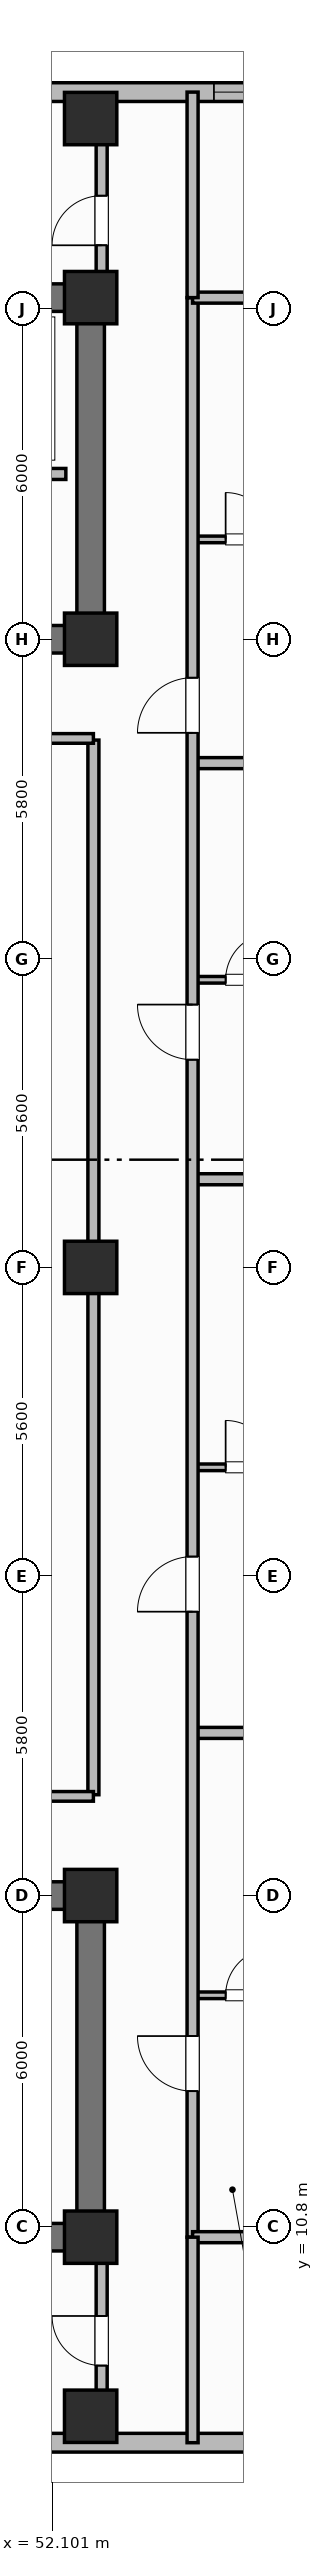
"""IFC4 building model, lengths in metres.
Left out: names, types, materials, properties, quantities, classifications, styles, units other than length and angle.
Written with IfcOpenShell. Run it as: python <this file> out.ifc"""

import sys

from ifc_helpers import new_model, si_unit, direction, frame, frame_2d, origin, origin_2d, place, context, subcontext, project, spatial, rectangle, extrude, element, fill, save


model = new_model("IFC4")
c1 = context("Model", 3, precision=1e-05, world=origin(), true_north=direction((0.0, 1.0)))
c2 = subcontext(c1, "Body", "Model", "MODEL_VIEW")
j1 = project(units=[si_unit("LENGTHUNIT", "METRE"), si_unit("PLANEANGLEUNIT", "RADIAN")], contexts=[c1])
p1 = place(None, origin())
s1 = spatial("IfcSite", under=j1, at=p1, CompositionType="ELEMENT")
p2 = place(p1, origin())
s2 = spatial("IfcBuilding", under=s1, at=p2, CompositionType="ELEMENT")
p3 = place(p2, frame((0.0, 0.0, 177.4)))
s3 = spatial("IfcBuildingStorey", under=s2, at=p3, CompositionType="ELEMENT", Elevation=177.4)
p4 = place(p3, frame((52.8, 10.6, 0.0), z_axis=(0.0, 0.0, 1.0), x_axis=(-1.0, 0.0, 0.0)))
e1 = element("IfcWall", 1, at=p4, inside=s3, PredefinedType="SHEAR", context=c2, shape_type="SweptSolid", body=[
    extrude(rectangle(XDim=27.2, YDim=0.5, at=frame_2d((13.6, 0.0))), origin(), (0.0, 0.0, 1.0), 3.7),
])
p5 = place(p3, frame((52.8, 10.85, 0.0), z_axis=(0.0, 0.0, 1.0), x_axis=(0.0, 1.0, 0.0)))
e2 = element("IfcWall", 2, at=p5, inside=s3, PredefinedType="SHEAR", context=c2, shape_type="SweptSolid", body=[
    extrude(rectangle(XDim=5.7, YDim=0.5, at=frame_2d((2.85, 0.0))), origin(), (0.0, 0.0, 1.0), 3.7),
])
p6 = place(p3, frame((25.6, 16.8, 0.0), z_axis=(0.0, 0.0, 1.0), x_axis=(1.0, 0.0, 0.0)))
e3 = element("IfcWall", 3, at=p6, inside=s3, PredefinedType="SHEAR", context=c2, shape_type="SweptSolid", body=[
    extrude(rectangle(XDim=27.2, YDim=0.5, at=frame_2d((13.6, 0.0))), origin(), (0.0, 0.0, 1.0), 3.7),
])
p7 = place(p6, frame((1.9, 0.0, 0.0)))
e4 = element("IfcOpeningElement", 4, at=p7, cuts=e3, PredefinedType="OPENING", context=c2, shape_type="SweptSolid", body=[
    extrude(rectangle(XDim=1.1, YDim=2.15, at=frame_2d((0.55, 1.075))), frame((0.0, 0.26, 0.0), z_axis=(0.0, -1.0, 0.0), x_axis=(1.0, 0.0, 0.0)), (0.0, 0.0, 1.0), 0.52),
])
p8 = place(p6, frame((13.0, 0.0, 0.0)))
e5 = element("IfcOpeningElement", 5, at=p8, cuts=e3, PredefinedType="OPENING", context=c2, shape_type="SweptSolid", body=[
    extrude(rectangle(XDim=1.2, YDim=2.15, at=frame_2d((0.6, 1.075))), frame((0.0, 0.26, 0.0), z_axis=(0.0, -1.0, 0.0), x_axis=(1.0, 0.0, 0.0)), (0.0, 0.0, 1.0), 0.52),
])
p9 = place(p6, frame((21.6, 0.0, 0.0)))
e6 = element("IfcOpeningElement", 6, at=p9, cuts=e3, PredefinedType="OPENING", context=c2, shape_type="SweptSolid", body=[
    extrude(rectangle(XDim=1.0, YDim=2.15, at=frame_2d((0.5, 1.075))), frame((0.0, 0.26, 0.0), z_axis=(0.0, -1.0, 0.0), x_axis=(1.0, 0.0, 0.0)), (0.0, 0.0, 1.0), 0.52),
])
p10 = place(p3, frame((25.6, 45.8, 0.0), z_axis=(0.0, 0.0, 1.0), x_axis=(1.0, 0.0, 0.0)))
e7 = element("IfcWall", 7, at=p10, inside=s3, PredefinedType="SHEAR", context=c2, shape_type="SweptSolid", body=[
    extrude(rectangle(XDim=27.2, YDim=0.5, at=frame_2d((13.6, 0.0))), origin(), (0.0, 0.0, 1.0), 3.7),
])
p11 = place(p3, frame((52.8, 39.85, 0.0), z_axis=(0.0, 0.0, 1.0), x_axis=(0.0, 1.0, 0.0)))
e8 = element("IfcWall", 8, at=p11, inside=s3, PredefinedType="SHEAR", context=c2, shape_type="SweptSolid", body=[
    extrude(rectangle(XDim=5.7, YDim=0.5, at=frame_2d((2.85, 0.0))), origin(), (0.0, 0.0, 1.0), 3.7),
])
p12 = place(p3, frame((52.8, 39.6, 0.0), z_axis=(0.0, 0.0, 1.0), x_axis=(-1.0, 0.0, 0.0)))
e9 = element("IfcWall", 9, at=p12, inside=s3, PredefinedType="SHEAR", context=c2, shape_type="SweptSolid", body=[
    extrude(rectangle(XDim=27.2, YDim=0.5, at=frame_2d((13.6, 0.0))), origin(), (0.0, 0.0, 1.0), 3.7),
])
p13 = place(p12, frame((24.2, 0.0, 0.0)))
e10 = element("IfcOpeningElement", 10, at=p13, cuts=e9, PredefinedType="OPENING", context=c2, shape_type="SweptSolid", body=[
    extrude(rectangle(XDim=1.1, YDim=2.15, at=frame_2d((0.55, 1.075))), frame((0.0, 0.26, 0.0), z_axis=(0.0, -1.0, 0.0), x_axis=(1.0, 0.0, 0.0)), (0.0, 0.0, 1.0), 0.52),
])
p14 = place(p12, frame((15.1, 0.0, 0.0)))
e11 = element("IfcOpeningElement", 11, at=p14, cuts=e9, PredefinedType="OPENING", context=c2, shape_type="SweptSolid", body=[
    extrude(rectangle(XDim=1.2, YDim=2.15, at=frame_2d((0.6, 1.075))), frame((0.0, 0.26, 0.0), z_axis=(0.0, -1.0, 0.0), x_axis=(1.0, 0.0, 0.0)), (0.0, 0.0, 1.0), 0.52),
])
p15 = place(p12, frame((11.6, 0.0, 0.0)))
e12 = element("IfcOpeningElement", 12, at=p15, cuts=e9, PredefinedType="OPENING", context=c2, shape_type="SweptSolid", body=[
    extrude(rectangle(XDim=0.9, YDim=2.1, at=frame_2d((0.45, 1.05))), frame((0.0, 0.26, 0.0), z_axis=(0.0, -1.0, 0.0), x_axis=(1.0, 0.0, 0.0)), (0.0, 0.0, 1.0), 0.52),
])
p16 = place(p12, frame((7.35, 0.0, 0.0)))
e13 = element("IfcOpeningElement", 13, at=p16, cuts=e9, PredefinedType="OPENING", context=c2, shape_type="SweptSolid", body=[
    extrude(rectangle(XDim=0.85, YDim=2.1, at=frame_2d((0.425, 1.05))), frame((0.0, 0.26, 0.0), z_axis=(0.0, -1.0, 0.0), x_axis=(1.0, 0.0, 0.0)), (0.0, 0.0, 1.0), 0.52),
])
p17 = place(p12, frame((3.6, 0.0, 0.0)))
e14 = element("IfcOpeningElement", 14, at=p17, cuts=e9, PredefinedType="OPENING", context=c2, shape_type="SweptSolid", body=[
    extrude(rectangle(XDim=1.0, YDim=2.15, at=frame_2d((0.5, 1.075))), frame((0.0, 0.26, 0.0), z_axis=(0.0, -1.0, 0.0), x_axis=(1.0, 0.0, 0.0)), (0.0, 0.0, 1.0), 0.52),
])
for number, where, z_axis, x_axis in (
    (15, (52.8, 10.6, 0.0), (0.0, 0.0, 1.0), (1.0, 0.0, 0.0)),
    (16, (52.8, 16.8, 0.0), (0.0, 0.0, 1.0), (1.0, 0.0, 0.0)),
    (17, (52.8, 39.6, 0.0), (0.0, 0.0, 1.0), (1.0, 0.0, 0.0)),
    (18, (52.8, 45.8, 0.0), (0.0, 0.0, 1.0), (1.0, 0.0, 0.0)),
    (19, (52.8, 28.2, 0.0), (0.0, 0.0, 1.0), (1.0, 0.0, 0.0)),
    (20, (52.8, 7.35, 0.0), (0.0, 0.0, 1.0), (1.0, 0.0, 0.0)),
    (21, (52.8, 49.05, 0.0), (0.0, 0.0, 1.0), (1.0, 0.0, 0.0)),
):
    element("IfcColumn", number, at=place(p3, frame(where, z_axis=z_axis, x_axis=x_axis)), inside=s3, PredefinedType="COLUMN", context=c2, shape_type="SweptSolid", body=[
        extrude(rectangle(XDim=0.95, YDim=0.95, at=origin_2d()), origin(), (0.0, 0.0, 1.0), 3.7),
    ])
p18 = place(p3, frame((51.25, 6.87, 0.0), z_axis=(0.0, 0.0, 1.0), x_axis=(1.0, 0.0, 0.0)))
e22 = element("IfcWall", 22, at=p18, inside=s3, PredefinedType="SOLIDWALL", context=c2, shape_type="SweptSolid", body=[
    extrude(rectangle(XDim=6.95, YDim=0.34, at=frame_2d((3.475, 0.0))), origin(), (0.0, 0.0, 1.0), 2.72),
])
p19 = place(p3, frame((58.2, 49.53, 0.0), z_axis=(0.0, 0.0, 1.0), x_axis=(-1.0, 0.0, 0.0)))
e23 = element("IfcWall", 23, at=p19, inside=s3, PredefinedType="SOLIDWALL", context=c2, shape_type="SweptSolid", body=[
    extrude(rectangle(XDim=15.8, YDim=0.34, at=frame_2d((7.9, 0.0))), origin(), (0.0, 0.0, 1.0), 2.72),
])
p20 = place(p19, frame((1.762, 0.0, 0.75)))
e24 = element("IfcOpeningElement", 24, at=p20, cuts=e23, PredefinedType="OPENING", context=c2, shape_type="SweptSolid", body=[
    extrude(rectangle(XDim=1.4, YDim=1.85, at=frame_2d((0.7, 0.925))), frame((0.0, 0.18, 0.0), z_axis=(0.0, -1.0, 0.0), x_axis=(1.0, 0.0, 0.0)), (0.0, 0.0, 1.0), 0.36),
])
p21 = place(p19, frame((8.663, 0.0, 0.75)))
e25 = element("IfcOpeningElement", 25, at=p21, cuts=e23, PredefinedType="OPENING", context=c2, shape_type="SweptSolid", body=[
    extrude(rectangle(XDim=1.4, YDim=1.85, at=frame_2d((0.7, 0.925))), frame((0.0, 0.18, 0.0), z_axis=(0.0, -1.0, 0.0), x_axis=(1.0, 0.0, 0.0)), (0.0, 0.0, 1.0), 0.36),
])
p22 = place(p19, frame((12.288, 0.0, 0.75)))
e26 = element("IfcOpeningElement", 26, at=p22, cuts=e23, PredefinedType="OPENING", context=c2, shape_type="SweptSolid", body=[
    extrude(rectangle(XDim=1.4, YDim=1.85, at=frame_2d((0.7, 0.925))), frame((0.0, 0.18, 0.0), z_axis=(0.0, -1.0, 0.0), x_axis=(1.0, 0.0, 0.0)), (0.0, 0.0, 1.0), 0.36),
])
p23 = place(p3, frame((52.35, 42.6, 0.0), z_axis=(0.0, 0.0, 1.0), x_axis=(-1.0, 0.0, 0.0)))
e27 = element("IfcWall", 27, at=p23, inside=s3, PredefinedType="PARTITIONING", context=c2, shape_type="SweptSolid", body=[
    extrude(rectangle(XDim=6.5, YDim=0.2, at=frame_2d((3.25, 0.0))), origin(), (0.0, 0.0, 1.0), 2.55),
])
p24 = place(p3, frame((52.85, 18.63, 0.0), z_axis=(0.0, 0.0, 1.0), x_axis=(0.0, 1.0, 0.0)))
e28 = element("IfcWall", 28, at=p24, inside=s3, PredefinedType="PARTITIONING", context=c2, shape_type="SweptSolid", body=[
    extrude(rectangle(XDim=19.14, YDim=0.2, at=frame_2d((9.57, 0.0))), origin(), (0.0, 0.0, 1.0), 2.55),
])
for number, where, z_axis, x_axis in (
    (29, (31.35, 18.6, 0.0), (0.0, 0.0, 1.0), (1.0, 0.0, 0.0)),
    (30, (31.35, 37.8, 0.0), (0.0, 0.0, 1.0), (1.0, 0.0, 0.0)),
):
    element("IfcWall", number, at=place(p3, frame(where, z_axis=z_axis, x_axis=x_axis)), inside=s3, PredefinedType="PARTITIONING", context=c2, shape_type="SweptSolid", body=[
        extrude(rectangle(XDim=21.5, YDim=0.175, at=frame_2d((10.75, 0.0))), origin(), (0.0, 0.0, 1.0), 2.55),
    ])
p25 = place(p3, frame((54.65, 14.99, 0.0), z_axis=(0.0, 0.0, 1.0), x_axis=(1.0, 0.0, 0.0)))
e31 = element("IfcWall", 31, at=p25, inside=s3, PredefinedType="PARTITIONING", context=c2, shape_type="SweptSolid", body=[
    extrude(rectangle(XDim=2.25, YDim=0.12, at=frame_2d((1.125, 0.0))), origin(), (0.0, 0.0, 1.0), 2.55),
])
p26 = place(p25, frame((0.6, 0.0, 0.0)))
e32 = element("IfcOpeningElement", 32, at=p26, cuts=e31, PredefinedType="OPENING", context=c2, shape_type="SweptSolid", body=[
    extrude(rectangle(XDim=0.85, YDim=2.1, at=frame_2d((0.425, 1.05))), frame((0.0, 0.07, 0.0), z_axis=(0.0, -1.0, 0.0), x_axis=(1.0, 0.0, 0.0)), (0.0, 0.0, 1.0), 0.14),
])
p27 = place(p3, frame((54.65, 19.752, 0.0), z_axis=(0.0, 0.0, 1.0), x_axis=(1.0, 0.0, 0.0)))
e33 = element("IfcWall", 33, at=p27, inside=s3, PredefinedType="PARTITIONING", context=c2, shape_type="SweptSolid", body=[
    extrude(rectangle(XDim=7.18, YDim=0.2, at=frame_2d((3.59, 0.0))), origin(), (0.0, 0.0, 1.0), 2.55),
])
p28 = place(p3, frame((54.65, 24.572, 0.0), z_axis=(0.0, 0.0, 1.0), x_axis=(1.0, 0.0, 0.0)))
e34 = element("IfcWall", 34, at=p28, inside=s3, PredefinedType="PARTITIONING", context=c2, shape_type="SweptSolid", body=[
    extrude(rectangle(XDim=2.25, YDim=0.12, at=frame_2d((1.125, 0.0))), origin(), (0.0, 0.0, 1.0), 2.55),
])
p29 = place(p28, frame((0.6, 0.0, 0.0)))
e35 = element("IfcOpeningElement", 35, at=p29, cuts=e34, PredefinedType="OPENING", context=c2, shape_type="SweptSolid", body=[
    extrude(rectangle(XDim=0.85, YDim=2.1, at=frame_2d((0.425, 1.05))), frame((0.0, 0.07, 0.0), z_axis=(0.0, -1.0, 0.0), x_axis=(1.0, 0.0, 0.0)), (0.0, 0.0, 1.0), 0.14),
])
p30 = place(p3, frame((54.65, 29.8, 0.0), z_axis=(0.0, 0.0, 1.0), x_axis=(1.0, 0.0, 0.0)))
e36 = element("IfcWall", 36, at=p30, inside=s3, PredefinedType="PARTITIONING", context=c2, shape_type="SweptSolid", body=[
    extrude(rectangle(XDim=6.78, YDim=0.2, at=frame_2d((3.39, 0.0))), origin(), (0.0, 0.0, 1.0), 2.55),
])
p31 = place(p3, frame((54.65, 33.42, 0.0), z_axis=(0.0, 0.0, 1.0), x_axis=(1.0, 0.0, 0.0)))
e37 = element("IfcWall", 37, at=p31, inside=s3, PredefinedType="PARTITIONING", context=c2, shape_type="SweptSolid", body=[
    extrude(rectangle(XDim=2.25, YDim=0.12, at=frame_2d((1.125, 0.0))), origin(), (0.0, 0.0, 1.0), 2.55),
])
p32 = place(p31, frame((0.6, 0.0, 0.0)))
e38 = element("IfcOpeningElement", 38, at=p32, cuts=e37, PredefinedType="OPENING", context=c2, shape_type="SweptSolid", body=[
    extrude(rectangle(XDim=0.85, YDim=2.1, at=frame_2d((0.425, 1.05))), frame((0.0, 0.07, 0.0), z_axis=(0.0, -1.0, 0.0), x_axis=(1.0, 0.0, 0.0)), (0.0, 0.0, 1.0), 0.14),
])
p33 = place(p3, frame((54.65, 37.352, 0.0), z_axis=(0.0, 0.0, 1.0), x_axis=(1.0, 0.0, 0.0)))
e39 = element("IfcWall", 39, at=p33, inside=s3, PredefinedType="PARTITIONING", context=c2, shape_type="SweptSolid", body=[
    extrude(rectangle(XDim=7.18, YDim=0.2, at=frame_2d((3.59, 0.0))), origin(), (0.0, 0.0, 1.0), 2.55),
])
p34 = place(p3, frame((54.65, 41.412, 0.0), z_axis=(0.0, 0.0, 1.0), x_axis=(1.0, 0.0, 0.0)))
e40 = element("IfcWall", 40, at=p34, inside=s3, PredefinedType="PARTITIONING", context=c2, shape_type="SweptSolid", body=[
    extrude(rectangle(XDim=2.25, YDim=0.12, at=frame_2d((1.125, 0.0))), origin(), (0.0, 0.0, 1.0), 2.55),
])
p35 = place(p34, frame((0.6, 0.0, 0.0)))
e41 = element("IfcOpeningElement", 41, at=p35, cuts=e40, PredefinedType="OPENING", context=c2, shape_type="SweptSolid", body=[
    extrude(rectangle(XDim=0.85, YDim=2.1, at=frame_2d((0.425, 1.05))), frame((0.0, 0.07, 0.0), z_axis=(0.0, -1.0, 0.0), x_axis=(1.0, 0.0, 0.0)), (0.0, 0.0, 1.0), 0.14),
])
p36 = place(p3, frame((54.65, 10.6, 0.0), z_axis=(0.0, 0.0, 1.0), x_axis=(0.0, 1.0, 0.0)))
e42 = element("IfcWall", 42, at=p36, inside=s3, PredefinedType="PARTITIONING", context=c2, shape_type="SweptSolid", body=[
    extrude(rectangle(XDim=35.2, YDim=0.2, at=frame_2d((17.6, 0.0))), origin(), (0.0, 0.0, 1.0), 2.55),
])
p37 = place(p36, frame((2.65, 0.0, 0.0)))
e43 = element("IfcOpeningElement", 43, at=p37, cuts=e42, PredefinedType="OPENING", context=c2, shape_type="SweptSolid", body=[
    extrude(rectangle(XDim=1.0, YDim=2.15, at=frame_2d((0.5, 1.075))), frame((0.0, 0.11, 0.0), z_axis=(0.0, -1.0, 0.0), x_axis=(1.0, 0.0, 0.0)), (0.0, 0.0, 1.0), 0.22),
])
p38 = place(p36, frame((11.352, 0.0, 0.0)))
e44 = element("IfcOpeningElement", 44, at=p38, cuts=e42, PredefinedType="OPENING", context=c2, shape_type="SweptSolid", body=[
    extrude(rectangle(XDim=1.0, YDim=2.15, at=frame_2d((0.5, 1.075))), frame((0.0, 0.11, 0.0), z_axis=(0.0, -1.0, 0.0), x_axis=(1.0, 0.0, 0.0)), (0.0, 0.0, 1.0), 0.22),
])
p39 = place(p36, frame((21.37, 0.0, 0.0)))
e45 = element("IfcOpeningElement", 45, at=p39, cuts=e42, PredefinedType="OPENING", context=c2, shape_type="SweptSolid", body=[
    extrude(rectangle(XDim=1.0, YDim=2.15, at=frame_2d((0.5, 1.075))), frame((0.0, 0.11, 0.0), z_axis=(0.0, -1.0, 0.0), x_axis=(1.0, 0.0, 0.0)), (0.0, 0.0, 1.0), 0.22),
])
p40 = place(p36, frame((27.302, 0.0, 0.0)))
e46 = element("IfcOpeningElement", 46, at=p40, cuts=e42, PredefinedType="OPENING", context=c2, shape_type="SweptSolid", body=[
    extrude(rectangle(XDim=1.0, YDim=2.15, at=frame_2d((0.5, 1.075))), frame((0.0, 0.11, 0.0), z_axis=(0.0, -1.0, 0.0), x_axis=(1.0, 0.0, 0.0)), (0.0, 0.0, 1.0), 0.22),
])
for number, where, z_axis, x_axis in (
    (47, (54.65, 10.6, 0.0), (0.0, 0.0, 1.0), (1.0, 0.0, 0.0)),
    (48, (54.65, 45.8, 0.0), (0.0, 0.0, 1.0), (1.0, 0.0, 0.0)),
):
    element("IfcWall", number, at=place(p3, frame(where, z_axis=z_axis, x_axis=x_axis)), inside=s3, PredefinedType="PARTITIONING", context=c2, shape_type="SweptSolid", body=[
        extrude(rectangle(XDim=6.76, YDim=0.2, at=frame_2d((3.38, 0.0))), origin(), (0.0, 0.0, 1.0), 2.55),
    ])
for number, where, z_axis, x_axis in (
    (49, (54.65, 6.87, 0.0), (0.0, 0.0, 1.0), (0.0, 1.0, 0.0)),
    (50, (54.65, 45.8, 0.0), (0.0, 0.0, 1.0), (0.0, 1.0, 0.0)),
):
    element("IfcWall", number, at=place(p3, frame(where, z_axis=z_axis, x_axis=x_axis)), inside=s3, PredefinedType="PARTITIONING", context=c2, shape_type="SweptSolid", body=[
        extrude(rectangle(XDim=3.73, YDim=0.2, at=frame_2d((1.865, 0.0))), origin(), (0.0, 0.0, 1.0), 2.55),
    ])
p41 = place(p3, frame((53.0, 7.62, 0.0), z_axis=(0.0, 0.0, 1.0), x_axis=(0.0, 1.0, 0.0)))
e51 = element("IfcWall", 51, at=p41, inside=s3, PredefinedType="PARTITIONING", context=c2, shape_type="SweptSolid", body=[
    extrude(rectangle(XDim=2.68, YDim=0.2, at=frame_2d((1.34, 0.0))), origin(), (0.0, 0.0, 1.0), 2.55),
])
p42 = place(p41, frame((0.65, 0.0, 0.0)))
e52 = element("IfcOpeningElement", 52, at=p42, cuts=e51, PredefinedType="OPENING", context=c2, shape_type="SweptSolid", body=[
    extrude(rectangle(XDim=0.9, YDim=2.1, at=frame_2d((0.45, 1.05))), frame((0.0, 0.11, 0.0), z_axis=(0.0, -1.0, 0.0), x_axis=(1.0, 0.0, 0.0)), (0.0, 0.0, 1.0), 0.22),
])
p43 = place(p3, frame((53.0, 46.1, 0.0), z_axis=(0.0, 0.0, 1.0), x_axis=(0.0, 1.0, 0.0)))
e53 = element("IfcWall", 53, at=p43, inside=s3, PredefinedType="PARTITIONING", context=c2, shape_type="SweptSolid", body=[
    extrude(rectangle(XDim=2.68, YDim=0.2, at=frame_2d((1.34, 0.0))), origin(), (0.0, 0.0, 1.0), 2.55),
])
p44 = place(p43, frame((0.65, 0.0, 0.0)))
e54 = element("IfcOpeningElement", 54, at=p44, cuts=e53, PredefinedType="OPENING", context=c2, shape_type="SweptSolid", body=[
    extrude(rectangle(XDim=0.9, YDim=2.1, at=frame_2d((0.45, 1.05))), frame((0.0, 0.11, 0.0), z_axis=(0.0, -1.0, 0.0), x_axis=(1.0, 0.0, 0.0)), (0.0, 0.0, 1.0), 0.22),
])
p45 = place(p20, origin())
e55 = element("IfcWindow", 55, at=p45, inside=s3, PartitioningType="SINGLE_PANEL", PredefinedType="WINDOW", context=c2, shape_type="SweptSolid", body=[
    extrude(rectangle(XDim=1.4, YDim=1.85, at=frame_2d((0.7, 0.925))), frame((0.0, 0.03, 0.0), z_axis=(0.0, -1.0, 0.0), x_axis=(1.0, 0.0, 0.0)), (0.0, 0.0, 1.0), 0.06),
])
fill(e24, e55)
p46 = place(p26, origin())
e56 = element("IfcDoor", 56, at=p46, inside=s3, OperationType="SINGLE_SWING_RIGHT", PredefinedType="DOOR", context=c2, shape_type="SweptSolid", body=[
    extrude(rectangle(XDim=0.85, YDim=2.1, at=frame_2d((0.425, 1.05))), frame((0.0, 0.025, 0.0), z_axis=(0.0, -1.0, 0.0), x_axis=(1.0, 0.0, 0.0)), (0.0, 0.0, 1.0), 0.05),
])
fill(e32, e56)
p47 = place(p29, origin())
e57 = element("IfcDoor", 57, at=p47, inside=s3, OperationType="SINGLE_SWING_LEFT", PredefinedType="DOOR", context=c2, shape_type="SweptSolid", body=[
    extrude(rectangle(XDim=0.85, YDim=2.1, at=frame_2d((0.425, 1.05))), frame((0.0, 0.025, 0.0), z_axis=(0.0, -1.0, 0.0), x_axis=(1.0, 0.0, 0.0)), (0.0, 0.0, 1.0), 0.05),
])
fill(e35, e57)
p48 = place(p32, origin())
e58 = element("IfcDoor", 58, at=p48, inside=s3, OperationType="SINGLE_SWING_RIGHT", PredefinedType="DOOR", context=c2, shape_type="SweptSolid", body=[
    extrude(rectangle(XDim=0.85, YDim=2.1, at=frame_2d((0.425, 1.05))), frame((0.0, 0.025, 0.0), z_axis=(0.0, -1.0, 0.0), x_axis=(1.0, 0.0, 0.0)), (0.0, 0.0, 1.0), 0.05),
])
fill(e38, e58)
p49 = place(p35, origin())
e59 = element("IfcDoor", 59, at=p49, inside=s3, OperationType="SINGLE_SWING_LEFT", PredefinedType="DOOR", context=c2, shape_type="SweptSolid", body=[
    extrude(rectangle(XDim=0.85, YDim=2.1, at=frame_2d((0.425, 1.05))), frame((0.0, 0.025, 0.0), z_axis=(0.0, -1.0, 0.0), x_axis=(1.0, 0.0, 0.0)), (0.0, 0.0, 1.0), 0.05),
])
fill(e41, e59)
p50 = place(p37, origin())
e60 = element("IfcDoor", 60, at=p50, inside=s3, OperationType="SINGLE_SWING_RIGHT", PredefinedType="DOOR", context=c2, shape_type="SweptSolid", body=[
    extrude(rectangle(XDim=1.0, YDim=2.15, at=frame_2d((0.5, 1.075))), frame((0.0, 0.025, 0.0), z_axis=(0.0, -1.0, 0.0), x_axis=(1.0, 0.0, 0.0)), (0.0, 0.0, 1.0), 0.05),
])
fill(e43, e60)
p51 = place(p38, origin())
e61 = element("IfcDoor", 61, at=p51, inside=s3, OperationType="SINGLE_SWING_LEFT", PredefinedType="DOOR", context=c2, shape_type="SweptSolid", body=[
    extrude(rectangle(XDim=1.0, YDim=2.15, at=frame_2d((0.5, 1.075))), frame((0.0, 0.025, 0.0), z_axis=(0.0, -1.0, 0.0), x_axis=(1.0, 0.0, 0.0)), (0.0, 0.0, 1.0), 0.05),
])
fill(e44, e61)
p52 = place(p39, origin())
e62 = element("IfcDoor", 62, at=p52, inside=s3, OperationType="SINGLE_SWING_RIGHT", PredefinedType="DOOR", context=c2, shape_type="SweptSolid", body=[
    extrude(rectangle(XDim=1.0, YDim=2.15, at=frame_2d((0.5, 1.075))), frame((0.0, 0.025, 0.0), z_axis=(0.0, -1.0, 0.0), x_axis=(1.0, 0.0, 0.0)), (0.0, 0.0, 1.0), 0.05),
])
fill(e45, e62)
p53 = place(p40, origin())
e63 = element("IfcDoor", 63, at=p53, inside=s3, OperationType="SINGLE_SWING_LEFT", PredefinedType="DOOR", context=c2, shape_type="SweptSolid", body=[
    extrude(rectangle(XDim=1.0, YDim=2.15, at=frame_2d((0.5, 1.075))), frame((0.0, 0.025, 0.0), z_axis=(0.0, -1.0, 0.0), x_axis=(1.0, 0.0, 0.0)), (0.0, 0.0, 1.0), 0.05),
])
fill(e46, e63)
p54 = place(p42, origin())
e64 = element("IfcDoor", 64, at=p54, inside=s3, OperationType="SINGLE_SWING_RIGHT", PredefinedType="DOOR", context=c2, shape_type="SweptSolid", body=[
    extrude(rectangle(XDim=0.9, YDim=2.1, at=frame_2d((0.45, 1.05))), frame((0.0, 0.025, 0.0), z_axis=(0.0, -1.0, 0.0), x_axis=(1.0, 0.0, 0.0)), (0.0, 0.0, 1.0), 0.05),
])
fill(e52, e64)
p55 = place(p44, origin())
e65 = element("IfcDoor", 65, at=p55, inside=s3, OperationType="SINGLE_SWING_LEFT", PredefinedType="DOOR", context=c2, shape_type="SweptSolid", body=[
    extrude(rectangle(XDim=0.9, YDim=2.1, at=frame_2d((0.45, 1.05))), frame((0.0, 0.025, 0.0), z_axis=(0.0, -1.0, 0.0), x_axis=(1.0, 0.0, 0.0)), (0.0, 0.0, 1.0), 0.05),
])
fill(e54, e65)
save(model, sys.argv[1])
